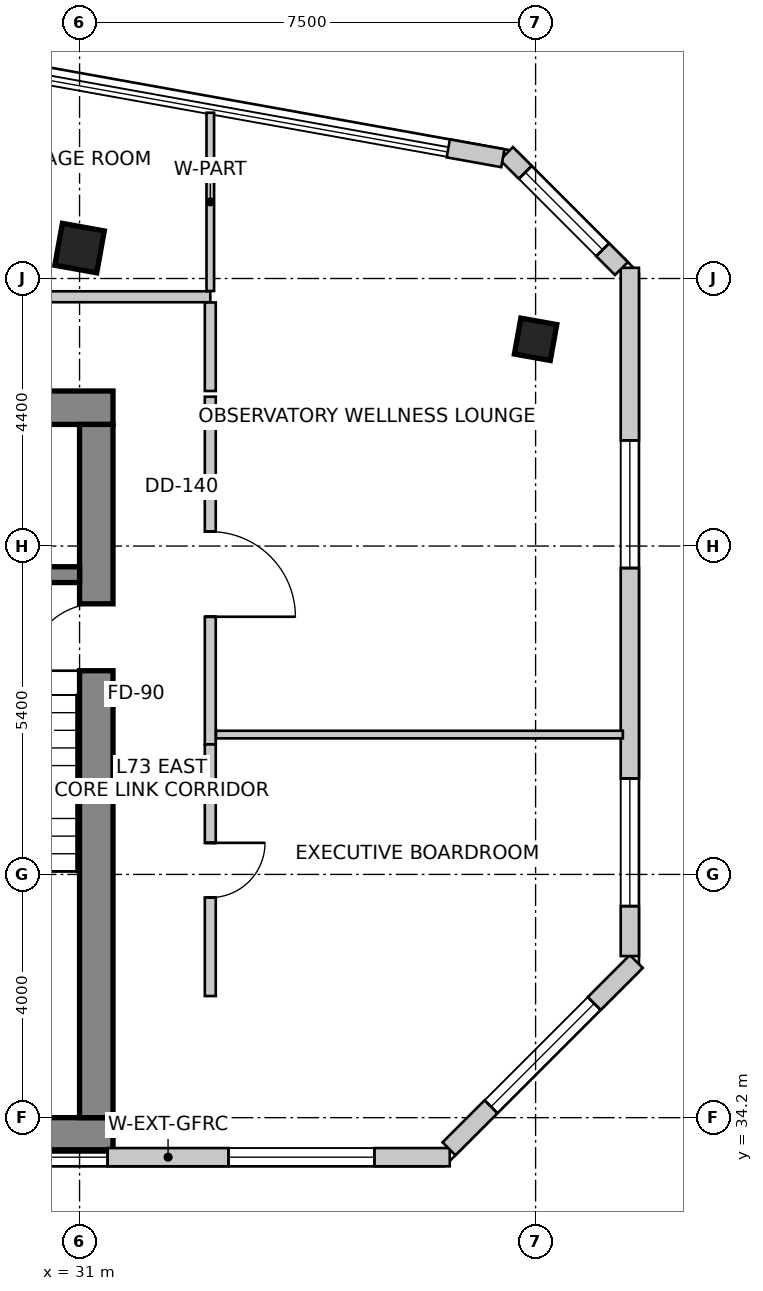
"""IFC4 building model, lengths in metres.
Left out: names, types, materials, properties, quantities, classifications, styles, units other than length and angle.
Written with IfcOpenShell. Run it as: python <this file> out.ifc"""

import sys

from ifc_helpers import new_model, si_unit, direction, frame, frame_2d, origin, origin_2d, place, context, subcontext, project, spatial, rectangle, extrude, source, transform, mapped, element, fill, save


model = new_model("IFC4")
c1 = context("Model", 3, precision=1e-05, world=origin(), true_north=direction((0.0, 1.0)))
c2 = subcontext(c1, "Body", "Model", "MODEL_VIEW")
j1 = project(units=[si_unit("LENGTHUNIT", "METRE"), si_unit("PLANEANGLEUNIT", "RADIAN")], contexts=[c1])
p1 = place(None, origin())
s1 = spatial("IfcSite", under=j1, at=p1, CompositionType="ELEMENT")
p2 = place(p1, origin())
s2 = spatial("IfcBuilding", under=s1, at=p2, CompositionType="ELEMENT")
p3 = place(p2, frame((0.0, 0.0, 285.3)))
s3 = spatial("IfcBuildingStorey", under=s2, at=p3, CompositionType="ELEMENT", Elevation=285.3)
p4 = place(p3, frame((16.05, 45.875, 0.0), z_axis=(0.0, 0.0, 1.0), x_axis=(1.0, 0.0, 0.0)))
e1 = element("IfcWall", 1, at=p4, inside=s3, PredefinedType="SHEAR", context=c2, shape_type="SweptSolid", body=[
    extrude(rectangle(XDim=15.5, YDim=0.55, at=frame_2d((7.75, 0.0))), origin(), (0.0, 0.0, 1.0), 3.6),
])
p5 = place(p3, frame((16.05, 33.925, 0.0), z_axis=(0.0, 0.0, 1.0), x_axis=(1.0, 0.0, 0.0)))
e2 = element("IfcWall", 2, at=p5, inside=s3, PredefinedType="SHEAR", context=c2, shape_type="SweptSolid", body=[
    extrude(rectangle(XDim=15.5, YDim=0.55, at=frame_2d((7.75, 0.0))), origin(), (0.0, 0.0, 1.0), 3.6),
])
m1 = source(origin(), c2, "Body", "SweptSolid", [
    extrude(rectangle(XDim=1.1, YDim=2.15, at=frame_2d((0.55, 1.075))), frame((0.0, 0.285, 0.0), z_axis=(0.0, -1.0, 0.0), x_axis=(1.0, 0.0, 0.0)), (0.0, 0.0, 1.0), 0.57),
])
p6 = place(p5, frame((9.98, 0.0, 0.0)))
e3 = element("IfcOpeningElement", 3, at=p6, cuts=e2, PredefinedType="OPENING", context=c2, shape_type="MappedRepresentation", body=[
    mapped(m1, transform((0.0, 0.0, 0.0), scale=1.0)),
])
p7 = place(p3, frame((31.275, 34.2, 0.0), z_axis=(0.0, 0.0, 1.0), x_axis=(0.0, 1.0, 0.0)))
e4 = element("IfcWall", 4, at=p7, inside=s3, PredefinedType="SHEAR", context=c2, shape_type="SweptSolid", body=[
    extrude(rectangle(XDim=11.4, YDim=0.55, at=frame_2d((5.7, 0.0))), origin(), (0.0, 0.0, 1.0), 3.6),
])
p8 = place(p7, frame((7.35, 0.0, 0.0)))
e5 = element("IfcOpeningElement", 5, at=p8, cuts=e4, PredefinedType="OPENING", context=c2, shape_type="MappedRepresentation", body=[
    mapped(m1, transform((0.0, 0.0, 0.0), scale=1.0)),
])
p9 = place(p3, frame((27.5, 43.13, 0.0), z_axis=(0.0, 0.0, 1.0), x_axis=(1.0, 0.0, 0.0)))
e6 = element("IfcWall", 6, at=p9, inside=s3, PredefinedType="SHEAR", context=c2, shape_type="SweptSolid", body=[
    extrude(rectangle(XDim=3.5, YDim=0.26, at=frame_2d((1.75, 0.0))), origin(), (0.0, 0.0, 1.0), 3.6),
])
m2 = source(origin(), c2, "Body", "SweptSolid", [
    extrude(rectangle(XDim=0.7, YDim=0.7, at=origin_2d()), origin(), (0.0, 0.0, 1.0), 3.6),
])
p10 = place(p3, frame((31.0, 48.5, 0.0), z_axis=(0.0, 0.0, 1.0), x_axis=(0.984195607969, -0.17708474032, 0.0)))
e7 = element("IfcColumn", 7, at=p10, inside=s3, PredefinedType="COLUMN", context=c2, shape_type="MappedRepresentation", body=[
    mapped(m2, transform((0.0, 0.0, 0.0), scale=1.0)),
])
m3 = source(origin(), c2, "Body", "SweptSolid", [
    extrude(rectangle(XDim=0.6, YDim=0.6, at=origin_2d()), origin(), (0.0, 0.0, 1.0), 3.6),
])
p11 = place(p3, frame((38.5, 47.0, 0.0), z_axis=(0.0, 0.0, 1.0), x_axis=(0.984195607969, -0.17708474032, 0.0)))
e8 = element("IfcColumn", 8, at=p11, inside=s3, PredefinedType="COLUMN", context=c2, shape_type="MappedRepresentation", body=[
    mapped(m3, transform((0.0, 0.0, 0.0), scale=1.0)),
])
p12 = place(p3, frame((27.973, 33.55, 0.0), z_axis=(0.0, 0.0, 1.0), x_axis=(1.0, 0.0, 0.0)))
e9 = element("IfcWall", 9, at=p12, inside=s3, PredefinedType="SOLIDWALL", context=c2, shape_type="SweptSolid", body=[
    extrude(rectangle(XDim=9.115, YDim=0.3, at=frame_2d((4.558, 0.0))), origin(), (0.0, 0.0, 1.0), 3.35),
])
m4 = source(origin(), c2, "Body", "SweptSolid", [
    extrude(rectangle(XDim=2.1, YDim=2.0, at=frame_2d((1.05, 1.0))), frame((0.0, 0.16, 0.0), z_axis=(0.0, -1.0, 0.0), x_axis=(1.0, 0.0, 0.0)), (0.0, 0.0, 1.0), 0.32),
])
p13 = place(p12, frame((1.389, 0.0, 0.85)))
e10 = element("IfcOpeningElement", 10, at=p13, cuts=e9, PredefinedType="OPENING", context=c2, shape_type="MappedRepresentation", body=[
    mapped(m4, transform((0.0, 0.0, 0.0), scale=1.0)),
])
m5 = source(origin(), c2, "Body", "SweptSolid", [
    extrude(rectangle(XDim=2.4, YDim=2.2, at=frame_2d((1.2, 1.1))), frame((0.0, 0.16, 0.0), z_axis=(0.0, -1.0, 0.0), x_axis=(1.0, 0.0, 0.0)), (0.0, 0.0, 1.0), 0.32),
])
p14 = place(p12, frame((5.476, 0.0, 0.85)))
e11 = element("IfcOpeningElement", 11, at=p14, cuts=e9, PredefinedType="OPENING", context=c2, shape_type="MappedRepresentation", body=[
    mapped(m5, transform((0.0, 0.0, 0.0), scale=1.0)),
])
p15 = place(p3, frame((37.076, 33.688, 0.0), z_axis=(0.0, 0.0, 1.0), x_axis=(0.707078757535, 0.707134803727, 0.0)))
e12 = element("IfcWall", 12, at=p15, inside=s3, PredefinedType="SOLIDWALL", context=c2, shape_type="SweptSolid", body=[
    extrude(rectangle(XDim=4.356, YDim=0.3, at=frame_2d((2.178, 0.0))), origin(), (0.0, 0.0, 1.0), 3.35),
])
p16 = place(p15, frame((0.978, 0.0, 0.85)))
e13 = element("IfcOpeningElement", 13, at=p16, cuts=e12, PredefinedType="OPENING", context=c2, shape_type="MappedRepresentation", body=[
    mapped(m5, transform((0.0, 0.0, 0.0), scale=1.0)),
])
p17 = place(p3, frame((40.05, 36.857, 0.0), z_axis=(0.0, 0.0, 1.0), x_axis=(0.0, 1.0, 0.0)))
e14 = element("IfcWall", 14, at=p17, inside=s3, PredefinedType="SOLIDWALL", context=c2, shape_type="SweptSolid", body=[
    extrude(rectangle(XDim=11.318, YDim=0.3, at=frame_2d((5.659, 0.0))), origin(), (0.0, 0.0, 1.0), 3.35),
])
p18 = place(p17, frame((0.821, 0.0, 0.85)))
e15 = element("IfcOpeningElement", 15, at=p18, cuts=e14, PredefinedType="OPENING", context=c2, shape_type="MappedRepresentation", body=[
    mapped(m4, transform((0.0, 0.0, 0.0), scale=1.0)),
])
p19 = place(p17, frame((6.381, 0.0, 0.85)))
e16 = element("IfcOpeningElement", 16, at=p19, cuts=e14, PredefinedType="OPENING", context=c2, shape_type="MappedRepresentation", body=[
    mapped(m4, transform((0.0, 0.0, 0.0), scale=1.0)),
])
p20 = place(p3, frame((39.912, 48.164, 0.0), z_axis=(0.0, 0.0, 1.0), x_axis=(-0.70715242601, 0.707061133417, 0.0)))
e17 = element("IfcWall", 17, at=p20, inside=s3, PredefinedType="SOLIDWALL", context=c2, shape_type="SweptSolid", body=[
    extrude(rectangle(XDim=2.674, YDim=0.3, at=frame_2d((1.337, 0.0))), origin(), (0.0, 0.0, 1.0), 3.35),
])
m6 = source(origin(), c2, "Body", "SweptSolid", [
    extrude(rectangle(XDim=1.8, YDim=2.1, at=frame_2d((0.9, 1.05))), frame((0.0, 0.16, 0.0), z_axis=(0.0, -1.0, 0.0), x_axis=(1.0, 0.0, 0.0)), (0.0, 0.0, 1.0), 0.32),
])
p21 = place(p20, frame((0.437, 0.0, 0.85)))
e18 = element("IfcOpeningElement", 18, at=p21, cuts=e17, PredefinedType="OPENING", context=c2, shape_type="MappedRepresentation", body=[
    mapped(m6, transform((0.0, 0.0, 0.0), scale=1.0)),
])
p22 = place(p3, frame((37.962, 49.979, 0.0), z_axis=(0.0, 0.0, 1.0), x_axis=(-0.984215051171, 0.176976645491, 0.0)))
e19 = element("IfcWall", 19, at=p22, inside=s3, PredefinedType="SOLIDWALL", context=c2, shape_type="SweptSolid", body=[
    extrude(rectangle(XDim=0.912, YDim=0.3, at=frame_2d((0.456, 0.0))), origin(), (0.0, 0.0, 1.0), 3.35),
])
p23 = place(p3, frame((28.362, 47.7, 0.0), z_axis=(0.0, 0.0, 1.0), x_axis=(1.0, 0.0, 0.0)))
e20 = element("IfcWall", 20, at=p23, inside=s3, PredefinedType="PARTITIONING", context=c2, shape_type="SweptSolid", body=[
    extrude(rectangle(XDim=4.788, YDim=0.18, at=frame_2d((2.394, 0.0))), origin(), (0.0, 0.0, 1.0), 2.879),
])
m7 = source(origin(), c2, "Body", "SweptSolid", [
    extrude(rectangle(XDim=0.85, YDim=2.15, at=frame_2d((0.425, 1.075))), frame((0.0, 0.1, 0.0), z_axis=(0.0, -1.0, 0.0), x_axis=(1.0, 0.0, 0.0)), (0.0, 0.0, 1.0), 0.2),
])
p24 = place(p23, frame((0.401, 0.0, 0.0)))
e21 = element("IfcOpeningElement", 21, at=p24, cuts=e20, PredefinedType="OPENING", context=c2, shape_type="MappedRepresentation", body=[
    mapped(m7, transform((0.0, 0.0, 0.0), scale=1.0)),
])
p25 = place(p3, frame((33.15, 47.606, 0.0), z_axis=(0.0, 0.0, 1.0), x_axis=(0.0, -1.0, 0.0)))
e22 = element("IfcWall", 22, at=p25, inside=s3, PredefinedType="PARTITIONING", context=c2, shape_type="SweptSolid", body=[
    extrude(rectangle(XDim=1.456, YDim=0.18, at=frame_2d((0.728, 0.0))), origin(), (0.0, 0.0, 1.0), 3.35),
])
p26 = place(p3, frame((33.15, 46.056, 0.0), z_axis=(0.0, 0.0, 1.0), x_axis=(0.0, -1.0, 0.0)))
e23 = element("IfcWall", 23, at=p26, inside=s3, PredefinedType="PARTITIONING", context=c2, shape_type="SweptSolid", body=[
    extrude(rectangle(XDim=5.716, YDim=0.18, at=frame_2d((2.858, 0.0))), origin(), (0.0, 0.0, 1.0), 2.879),
])
m8 = source(origin(), c2, "Body", "SweptSolid", [
    extrude(rectangle(XDim=1.4, YDim=2.15, at=frame_2d((0.7, 1.075))), frame((0.0, 0.1, 0.0), z_axis=(0.0, -1.0, 0.0), x_axis=(1.0, 0.0, 0.0)), (0.0, 0.0, 1.0), 0.2),
])
p27 = place(p26, frame((2.219, 0.0, 0.0)))
e24 = element("IfcOpeningElement", 24, at=p27, cuts=e23, PredefinedType="OPENING", context=c2, shape_type="MappedRepresentation", body=[
    mapped(m8, transform((0.0, 0.0, 0.0), scale=1.0)),
])
p28 = place(p3, frame((33.15, 40.338, 0.0), z_axis=(0.0, 0.0, 1.0), x_axis=(0.0, -1.0, 0.0)))
e25 = element("IfcWall", 25, at=p28, inside=s3, PredefinedType="PARTITIONING", context=c2, shape_type="SweptSolid", body=[
    extrude(rectangle(XDim=4.138, YDim=0.18, at=frame_2d((2.069, 0.0))), origin(), (0.0, 0.0, 1.0), 3.35),
])
m9 = source(origin(), c2, "Body", "SweptSolid", [
    extrude(rectangle(XDim=0.9, YDim=2.15, at=frame_2d((0.45, 1.075))), frame((0.0, 0.1, 0.0), z_axis=(0.0, -1.0, 0.0), x_axis=(1.0, 0.0, 0.0)), (0.0, 0.0, 1.0), 0.2),
])
p29 = place(p28, frame((1.619, 0.0, 0.0)))
e26 = element("IfcOpeningElement", 26, at=p29, cuts=e25, PredefinedType="OPENING", context=c2, shape_type="MappedRepresentation", body=[
    mapped(m9, transform((0.0, 0.0, 0.0), scale=1.0)),
])
p30 = place(p3, frame((33.15, 50.727, 0.0), z_axis=(0.0, 0.0, 1.0), x_axis=(0.0, -1.0, 0.0)))
e27 = element("IfcWall", 27, at=p30, inside=s3, PredefinedType="PARTITIONING", context=c2, shape_type="SweptSolid", body=[
    extrude(rectangle(XDim=2.933, YDim=0.125, at=frame_2d((1.466, 0.0))), origin(), (0.0, 0.0, 1.0), 2.642),
])
p31 = place(p3, frame((39.935, 40.5, 0.0), z_axis=(0.0, 0.0, 1.0), x_axis=(-1.0, 0.0, 0.0)))
e28 = element("IfcWall", 28, at=p31, inside=s3, PredefinedType="PARTITIONING", context=c2, shape_type="SweptSolid", body=[
    extrude(rectangle(XDim=6.691, YDim=0.125, at=frame_2d((3.346, 0.0))), origin(), (0.0, 0.0, 1.0), 3.35),
])
m10 = source(origin(), c2, "Body", "SweptSolid", [
    extrude(rectangle(XDim=2.1, YDim=2.0, at=frame_2d((1.05, 1.0))), frame((0.0, -0.015, 0.0), z_axis=(0.0, -1.0, 0.0), x_axis=(1.0, 0.0, 0.0)), (0.0, 0.0, 1.0), 0.06),
])
p32 = place(p13, origin())
e29 = element("IfcWindow", 29, at=p32, inside=s3, PartitioningType="SINGLE_PANEL", PredefinedType="WINDOW", context=c2, shape_type="MappedRepresentation", body=[
    mapped(m10, transform((0.0, 0.0, 0.0), scale=1.0)),
])
fill(e10, e29)
m11 = source(origin(), c2, "Body", "SweptSolid", [
    extrude(rectangle(XDim=2.4, YDim=2.2, at=frame_2d((1.2, 1.1))), frame((0.0, -0.015, 0.0), z_axis=(0.0, -1.0, 0.0), x_axis=(1.0, 0.0, 0.0)), (0.0, 0.0, 1.0), 0.06),
])
p33 = place(p14, origin())
e30 = element("IfcWindow", 30, at=p33, inside=s3, PartitioningType="SINGLE_PANEL", PredefinedType="WINDOW", context=c2, shape_type="MappedRepresentation", body=[
    mapped(m11, transform((0.0, 0.0, 0.0), scale=1.0)),
])
fill(e11, e30)
p34 = place(p16, origin())
e31 = element("IfcWindow", 31, at=p34, inside=s3, PartitioningType="SINGLE_PANEL", PredefinedType="WINDOW", context=c2, shape_type="MappedRepresentation", body=[
    mapped(m11, transform((0.0, 0.0, 0.0), scale=1.0)),
])
fill(e13, e31)
p35 = place(p18, origin())
e32 = element("IfcWindow", 32, at=p35, inside=s3, PartitioningType="SINGLE_PANEL", PredefinedType="WINDOW", context=c2, shape_type="MappedRepresentation", body=[
    mapped(m10, transform((0.0, 0.0, 0.0), scale=1.0)),
])
fill(e15, e32)
p36 = place(p19, origin())
e33 = element("IfcWindow", 33, at=p36, inside=s3, PartitioningType="SINGLE_PANEL", PredefinedType="WINDOW", context=c2, shape_type="MappedRepresentation", body=[
    mapped(m10, transform((0.0, 0.0, 0.0), scale=1.0)),
])
fill(e16, e33)
m12 = source(origin(), c2, "Body", "SweptSolid", [
    extrude(rectangle(XDim=1.8, YDim=2.1, at=frame_2d((0.9, 1.05))), frame((0.0, -0.015, 0.0), z_axis=(0.0, -1.0, 0.0), x_axis=(1.0, 0.0, 0.0)), (0.0, 0.0, 1.0), 0.06),
])
p37 = place(p21, origin())
e34 = element("IfcWindow", 34, at=p37, inside=s3, PartitioningType="SINGLE_PANEL", PredefinedType="WINDOW", context=c2, shape_type="MappedRepresentation", body=[
    mapped(m12, transform((0.0, 0.0, 0.0), scale=1.0)),
])
fill(e18, e34)
m13 = source(origin(), c2, "Body", "SweptSolid", [
    extrude(rectangle(XDim=1.1, YDim=2.15, at=frame_2d((0.55, 1.075))), frame((0.0, 0.025, 0.0), z_axis=(0.0, -1.0, 0.0), x_axis=(1.0, 0.0, 0.0)), (0.0, 0.0, 1.0), 0.05),
])
p38 = place(p8, origin())
e35 = element("IfcDoor", 35, at=p38, inside=s3, OperationType="SINGLE_SWING_LEFT", PredefinedType="DOOR", context=c2, shape_type="MappedRepresentation", body=[
    mapped(m13, transform((0.0, 0.0, 0.0), scale=1.0)),
])
fill(e5, e35)
m14 = source(origin(), c2, "Body", "SweptSolid", [
    extrude(rectangle(XDim=1.4, YDim=2.15, at=frame_2d((0.7, 1.075))), frame((0.0, 0.025, 0.0), z_axis=(0.0, -1.0, 0.0), x_axis=(1.0, 0.0, 0.0)), (0.0, 0.0, 1.0), 0.05),
])
p39 = place(p27, origin())
e36 = element("IfcDoor", 36, at=p39, inside=s3, OperationType="SINGLE_SWING_RIGHT", PredefinedType="DOOR", context=c2, shape_type="MappedRepresentation", body=[
    mapped(m14, transform((0.0, 0.0, 0.0), scale=1.0)),
])
fill(e24, e36)
m15 = source(origin(), c2, "Body", "SweptSolid", [
    extrude(rectangle(XDim=0.9, YDim=2.15, at=frame_2d((0.45, 1.075))), frame((0.0, 0.025, 0.0), z_axis=(0.0, -1.0, 0.0), x_axis=(1.0, 0.0, 0.0)), (0.0, 0.0, 1.0), 0.05),
])
p40 = place(p29, origin())
e37 = element("IfcDoor", 37, at=p40, inside=s3, OperationType="SINGLE_SWING_LEFT", PredefinedType="DOOR", context=c2, shape_type="MappedRepresentation", body=[
    mapped(m15, transform((0.0, 0.0, 0.0), scale=1.0)),
])
fill(e26, e37)
save(model, sys.argv[1])
